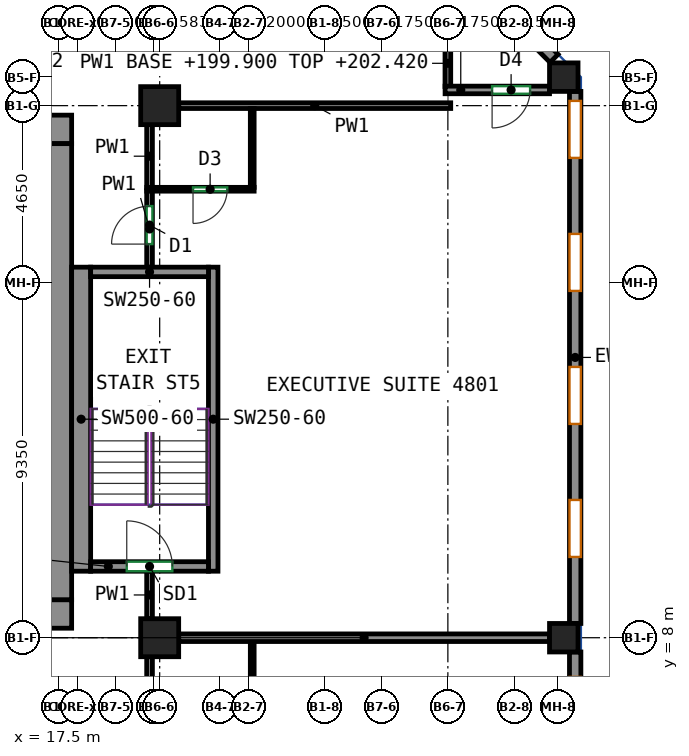
"""IFC4 building model, lengths in metres.
Left out: names, types, materials, properties, quantities, classifications, styles, units other than length and angle.
Written with IfcOpenShell. Run it as: python <this file> out.ifc"""

import sys

from ifc_helpers import new_model, si_unit, direction, frame, frame_2d, origin, origin_2d, place, context, subcontext, project, spatial, rectangle, extrude, source, transform, mapped, element, fill, save


model = new_model("IFC4")
c1 = context("Model", 3, precision=1e-05, world=origin(), true_north=direction((0.0, 1.0)))
c2 = subcontext(c1, "Body", "Model", "MODEL_VIEW")
j1 = project(units=[si_unit("LENGTHUNIT", "METRE"), si_unit("PLANEANGLEUNIT", "RADIAN")], contexts=[c1])
p1 = place(None, origin())
s1 = spatial("IfcSite", under=j1, at=p1, CompositionType="ELEMENT")
p2 = place(p1, origin())
s2 = spatial("IfcBuilding", under=s1, at=p2, CompositionType="ELEMENT")
p3 = place(p2, frame((0.0, 0.0, 199.9)))
s3 = spatial("IfcBuildingStorey", under=s2, at=p3, CompositionType="ELEMENT", Elevation=199.9)
m1 = source(origin(), c2, "Body", "SweptSolid", [
    extrude(rectangle(XDim=1.0, YDim=1.0, at=origin_2d()), origin(), (0.0, 0.0, 1.0), 3.12),
])
for number, where, z_axis, x_axis in (
    (1, (20.167, 8.0, 0.0), (0.0, 0.0, 1.0), (1.0, 0.0, 0.0)),
    (2, (20.167, 22.0, 0.0), (0.0, 0.0, 1.0), (1.0, 0.0, 0.0)),
):
    element("IfcColumn", number, at=place(p3, frame(where, z_axis=z_axis, x_axis=x_axis)), inside=s3, PredefinedType="COLUMN", context=c2, shape_type="MappedRepresentation", body=[
        mapped(m1, transform((0.0, 0.0, 0.0))),
    ])
m2 = source(origin(), c2, "Body", "SweptSolid", [
    extrude(rectangle(XDim=0.75, YDim=0.75, at=origin_2d()), origin(), (0.0, 0.0, 1.0), 3.12),
])
for number, where, z_axis, x_axis in (
    (3, (30.8, 8.0, 0.0), (0.0, 0.0, 1.0), (1.0, 0.0, 0.0)),
    (4, (30.8, 22.75, 0.0), (0.0, 0.0, 1.0), (1.0, 0.0, 0.0)),
):
    element("IfcColumn", number, at=place(p3, frame(where, z_axis=z_axis, x_axis=x_axis)), inside=s3, PredefinedType="COLUMN", context=c2, shape_type="MappedRepresentation", body=[
        mapped(m2, transform((0.0, 0.0, 0.0))),
    ])
m3 = source(origin(), c2, "Body", "SweptSolid", [
    extrude(rectangle(XDim=5.38, YDim=0.75, at=frame_2d((2.69, 0.0))), origin(), (0.0, 0.0, 1.0), 3.12),
])
p4 = place(p3, frame((12.47, 8.625, 0.0), z_axis=(0.0, 0.0, 1.0), x_axis=(1.0, 0.0, 0.0)))
e5 = element("IfcWall", 5, at=p4, inside=s3, PredefinedType="SHEAR", context=c2, shape_type="MappedRepresentation", body=[
    mapped(m3, transform((0.0, 0.0, 0.0))),
])
p5 = place(p4, frame((2.18, 0.0, 0.0)))
e6 = element("IfcOpeningElement", 6, at=p5, cuts=e5, PredefinedType="OPENING", context=c2, shape_type="SweptSolid", body=[
    extrude(rectangle(XDim=1.2, YDim=2.1, at=frame_2d((0.6, 1.05))), frame((0.0, 0.385, 0.0), z_axis=(0.0, -1.0, 0.0), x_axis=(1.0, 0.0, 0.0)), (0.0, 0.0, 1.0), 0.77),
])
m4 = source(origin(), c2, "Body", "SweptSolid", [
    extrude(rectangle(XDim=33.6, YDim=0.75, at=frame_2d((16.8, 0.0))), origin(), (0.0, 0.0, 1.0), 3.12),
])
p6 = place(p3, frame((-15.75, 21.375, 0.0), z_axis=(0.0, 0.0, 1.0), x_axis=(1.0, 0.0, 0.0)))
e7 = element("IfcWall", 7, at=p6, inside=s3, PredefinedType="SHEAR", context=c2, shape_type="MappedRepresentation", body=[
    mapped(m4, transform((0.0, 0.0, 0.0))),
])
p7 = place(p6, frame((8.27, 0.0, 0.0)))
e8 = element("IfcOpeningElement", 8, at=p7, cuts=e7, PredefinedType="OPENING", context=c2, shape_type="SweptSolid", body=[
    extrude(rectangle(XDim=0.9, YDim=2.1, at=frame_2d((0.45, 1.05))), frame((0.0, 0.385, 0.0), z_axis=(0.0, -1.0, 0.0), x_axis=(1.0, 0.0, 0.0)), (0.0, 0.0, 1.0), 0.77),
])
p8 = place(p6, frame((14.97, 0.0, 0.0)))
e9 = element("IfcOpeningElement", 9, at=p8, cuts=e7, PredefinedType="OPENING", context=c2, shape_type="SweptSolid", body=[
    extrude(rectangle(XDim=0.9, YDim=2.1, at=frame_2d((0.45, 1.05))), frame((0.0, 0.385, 0.0), z_axis=(0.0, -1.0, 0.0), x_axis=(1.0, 0.0, 0.0)), (0.0, 0.0, 1.0), 0.77),
])
p9 = place(p6, frame((19.794, 0.0, 0.0)))
e10 = element("IfcOpeningElement", 10, at=p9, cuts=e7, PredefinedType="OPENING", context=c2, shape_type="SweptSolid", body=[
    extrude(rectangle(XDim=0.9, YDim=2.1, at=frame_2d((0.45, 1.05))), frame((0.0, 0.385, 0.0), z_axis=(0.0, -1.0, 0.0), x_axis=(1.0, 0.0, 0.0)), (0.0, 0.0, 1.0), 0.77),
])
p10 = place(p6, frame((25.154, 0.0, 0.0)))
e11 = element("IfcOpeningElement", 11, at=p10, cuts=e7, PredefinedType="OPENING", context=c2, shape_type="SweptSolid", body=[
    extrude(rectangle(XDim=0.9, YDim=2.1, at=frame_2d((0.45, 1.05))), frame((0.0, 0.385, 0.0), z_axis=(0.0, -1.0, 0.0), x_axis=(1.0, 0.0, 0.0)), (0.0, 0.0, 1.0), 0.77),
])
p11 = place(p6, frame((2.275, 0.0, 0.0)))
e12 = element("IfcOpeningElement", 12, at=p11, cuts=e7, PredefinedType="OPENING", context=c2, shape_type="SweptSolid", body=[
    extrude(rectangle(XDim=0.9, YDim=2.1, at=frame_2d((0.45, 1.05))), frame((0.0, 0.385, 0.0), z_axis=(0.0, -1.0, 0.0), x_axis=(1.0, 0.0, 0.0)), (0.0, 0.0, 1.0), 0.77),
])
p12 = place(p6, frame((30.425, 0.0, 0.0)))
e13 = element("IfcOpeningElement", 13, at=p12, cuts=e7, PredefinedType="OPENING", context=c2, shape_type="SweptSolid", body=[
    extrude(rectangle(XDim=0.9, YDim=2.1, at=frame_2d((0.45, 1.05))), frame((0.0, 0.385, 0.0), z_axis=(0.0, -1.0, 0.0), x_axis=(1.0, 0.0, 0.0)), (0.0, 0.0, 1.0), 0.77),
])
m5 = source(origin(), c2, "Body", "SweptSolid", [
    extrude(rectangle(XDim=12.0, YDim=0.75, at=frame_2d((6.0, 0.0))), origin(), (0.0, 0.0, 1.0), 3.12),
])
p13 = place(p3, frame((17.475, 9.0, 0.0), z_axis=(0.0, 0.0, 1.0), x_axis=(0.0, 1.0, 0.0)))
e14 = element("IfcWall", 14, at=p13, inside=s3, PredefinedType="SHEAR", context=c2, shape_type="MappedRepresentation", body=[
    mapped(m5, transform((0.0, 0.0, 0.0))),
])
m6 = source(origin(), c2, "Body", "SweptSolid", [
    extrude(rectangle(XDim=8.0, YDim=0.5, at=frame_2d((4.0, 0.0))), origin(), (0.0, 0.0, 1.0), 3.12),
])
p14 = place(p3, frame((18.1, 9.75, 0.0), z_axis=(0.0, 0.0, 1.0), x_axis=(0.0, 1.0, 0.0)))
e15 = element("IfcWall", 15, at=p14, inside=s3, PredefinedType="SHEAR", context=c2, shape_type="MappedRepresentation", body=[
    mapped(m6, transform((0.0, 0.0, 0.0))),
])
m7 = source(origin(), c2, "Body", "SweptSolid", [
    extrude(rectangle(XDim=8.0, YDim=0.25, at=frame_2d((4.0, 0.0))), origin(), (0.0, 0.0, 1.0), 3.12),
])
p15 = place(p3, frame((21.575, 9.75, 0.0), z_axis=(0.0, 0.0, 1.0), x_axis=(0.0, 1.0, 0.0)))
e16 = element("IfcWall", 16, at=p15, inside=s3, PredefinedType="SHEAR", context=c2, shape_type="MappedRepresentation", body=[
    mapped(m7, transform((0.0, 0.0, 0.0))),
])
m8 = source(origin(), c2, "Body", "SweptSolid", [
    extrude(rectangle(XDim=3.1, YDim=0.25, at=frame_2d((1.55, 0.0))), origin(), (0.0, 0.0, 1.0), 3.12),
])
p16 = place(p3, frame((18.35, 9.875, 0.0), z_axis=(0.0, 0.0, 1.0), x_axis=(1.0, 0.0, 0.0)))
e17 = element("IfcWall", 17, at=p16, inside=s3, PredefinedType="SHEAR", context=c2, shape_type="MappedRepresentation", body=[
    mapped(m8, transform((0.0, 0.0, 0.0))),
])
p17 = place(p16, frame((0.95, 0.0, 0.0)))
e18 = element("IfcOpeningElement", 18, at=p17, cuts=e17, PredefinedType="OPENING", context=c2, shape_type="SweptSolid", body=[
    extrude(rectangle(XDim=1.2, YDim=2.1, at=frame_2d((0.6, 1.05))), frame((0.0, 0.135, 0.0), z_axis=(0.0, -1.0, 0.0), x_axis=(1.0, 0.0, 0.0)), (0.0, 0.0, 1.0), 0.27),
])
p18 = place(p3, frame((18.35, 17.625, 0.0), z_axis=(0.0, 0.0, 1.0), x_axis=(1.0, 0.0, 0.0)))
e19 = element("IfcWall", 19, at=p18, inside=s3, PredefinedType="SHEAR", context=c2, shape_type="MappedRepresentation", body=[
    mapped(m8, transform((0.0, 0.0, 0.0))),
])
m9 = source(origin(), c2, "Body", "SweptSolid", [
    extrude(rectangle(XDim=7.812, YDim=0.3, at=frame_2d((3.906, 0.0))), origin(), (0.0, 0.0, 1.0), 3.12),
])
p19 = place(p3, frame((31.1, -0.188, 0.0), z_axis=(0.0, 0.0, 1.0), x_axis=(0.0, 1.0, 0.0)))
e20 = element("IfcWall", 20, at=p19, inside=s3, PredefinedType="SOLIDWALL", context=c2, shape_type="MappedRepresentation", body=[
    mapped(m9, transform((0.0, 0.0, 0.0))),
])
p20 = place(p19, frame((1.75, 0.0, 0.85)))
e21 = element("IfcOpeningElement", 21, at=p20, cuts=e20, PredefinedType="OPENING", context=c2, shape_type="SweptSolid", body=[
    extrude(rectangle(XDim=1.5, YDim=1.95, at=frame_2d((0.75, 0.975))), frame((0.0, 0.16, 0.0), z_axis=(0.0, -1.0, 0.0), x_axis=(1.0, 0.0, 0.0)), (0.0, 0.0, 1.0), 0.32),
])
p21 = place(p19, frame((5.656, 0.0, 0.85)))
e22 = element("IfcOpeningElement", 22, at=p21, cuts=e20, PredefinedType="OPENING", context=c2, shape_type="SweptSolid", body=[
    extrude(rectangle(XDim=1.5, YDim=1.95, at=frame_2d((0.75, 0.975))), frame((0.0, 0.16, 0.0), z_axis=(0.0, -1.0, 0.0), x_axis=(1.0, 0.0, 0.0)), (0.0, 0.0, 1.0), 0.32),
])
m10 = source(origin(), c2, "Body", "SweptSolid", [
    extrude(rectangle(XDim=14.0, YDim=0.3, at=frame_2d((7.0, 0.0))), origin(), (0.0, 0.0, 1.0), 3.12),
])
p22 = place(p3, frame((31.1, 8.375, 0.0), z_axis=(0.0, 0.0, 1.0), x_axis=(0.0, 1.0, 0.0)))
e23 = element("IfcWall", 23, at=p22, inside=s3, PredefinedType="SOLIDWALL", context=c2, shape_type="MappedRepresentation", body=[
    mapped(m10, transform((0.0, 0.0, 0.0))),
])
p23 = place(p22, frame((1.75, 0.0, 0.85)))
e24 = element("IfcOpeningElement", 24, at=p23, cuts=e23, PredefinedType="OPENING", context=c2, shape_type="SweptSolid", body=[
    extrude(rectangle(XDim=1.5, YDim=1.95, at=frame_2d((0.75, 0.975))), frame((0.0, 0.16, 0.0), z_axis=(0.0, -1.0, 0.0), x_axis=(1.0, 0.0, 0.0)), (0.0, 0.0, 1.0), 0.32),
])
p24 = place(p22, frame((5.25, 0.0, 0.85)))
e25 = element("IfcOpeningElement", 25, at=p24, cuts=e23, PredefinedType="OPENING", context=c2, shape_type="SweptSolid", body=[
    extrude(rectangle(XDim=1.5, YDim=1.95, at=frame_2d((0.75, 0.975))), frame((0.0, 0.16, 0.0), z_axis=(0.0, -1.0, 0.0), x_axis=(1.0, 0.0, 0.0)), (0.0, 0.0, 1.0), 0.32),
])
p25 = place(p22, frame((8.75, 0.0, 0.85)))
e26 = element("IfcOpeningElement", 26, at=p25, cuts=e23, PredefinedType="OPENING", context=c2, shape_type="SweptSolid", body=[
    extrude(rectangle(XDim=1.5, YDim=1.95, at=frame_2d((0.75, 0.975))), frame((0.0, 0.16, 0.0), z_axis=(0.0, -1.0, 0.0), x_axis=(1.0, 0.0, 0.0)), (0.0, 0.0, 1.0), 0.32),
])
p26 = place(p22, frame((12.25, 0.0, 0.85)))
e27 = element("IfcOpeningElement", 27, at=p26, cuts=e23, PredefinedType="OPENING", context=c2, shape_type="SweptSolid", body=[
    extrude(rectangle(XDim=1.5, YDim=1.95, at=frame_2d((0.75, 0.975))), frame((0.0, 0.16, 0.0), z_axis=(0.0, -1.0, 0.0), x_axis=(1.0, 0.0, 0.0)), (0.0, 0.0, 1.0), 0.32),
])
m11 = source(origin(), c2, "Body", "SweptSolid", [
    extrude(rectangle(XDim=3.571, YDim=0.3, at=frame_2d((1.786, 0.0))), origin(), (0.0, 0.0, 1.0), 3.12),
])
p27 = place(p3, frame((30.544, 23.244, 0.0), z_axis=(0.0, 0.0, 1.0), x_axis=(-0.707140964879, 0.707072595841, 0.0)))
e28 = element("IfcWall", 28, at=p27, inside=s3, PredefinedType="SOLIDWALL", context=c2, shape_type="MappedRepresentation", body=[
    mapped(m11, transform((0.0, 0.0, 0.0))),
])
p28 = place(p27, frame((0.686, 0.0, 0.85)))
e29 = element("IfcOpeningElement", 29, at=p28, cuts=e28, PredefinedType="OPENING", context=c2, shape_type="SweptSolid", body=[
    extrude(rectangle(XDim=2.2, YDim=1.95, at=frame_2d((1.1, 0.975))), frame((0.0, 0.16, 0.0), z_axis=(0.0, -1.0, 0.0), x_axis=(1.0, 0.0, 0.0)), (0.0, 0.0, 1.0), 0.32),
])
p29 = place(p3, frame((19.9, 5.84, 0.0), z_axis=(0.0, 0.0, 1.0), x_axis=(0.0, 1.0, 0.0)))
e30 = element("IfcWall", 30, at=p29, inside=s3, PredefinedType="PARTITIONING", context=c2, shape_type="SweptSolid", body=[
    extrude(rectangle(XDim=1.66, YDim=0.15, at=frame_2d((0.83, 0.0))), origin(), (0.0, 0.0, 1.0), 2.52),
])
p30 = place(p3, frame((19.9, 17.75, 0.0), z_axis=(0.0, 0.0, 1.0), x_axis=(0.0, 1.0, 0.0)))
e31 = element("IfcWall", 31, at=p30, inside=s3, PredefinedType="PARTITIONING", context=c2, shape_type="SweptSolid", body=[
    extrude(rectangle(XDim=2.01, YDim=0.15, at=frame_2d((1.005, 0.0))), origin(), (0.0, 0.0, 1.0), 3.12),
])
p31 = place(p30, frame((0.607, 0.0, 0.0)))
e32 = element("IfcOpeningElement", 32, at=p31, cuts=e31, PredefinedType="OPENING", context=c2, shape_type="SweptSolid", body=[
    extrude(rectangle(XDim=1.0, YDim=2.1, at=frame_2d((0.5, 1.05))), frame((0.0, 0.085, 0.0), z_axis=(0.0, -1.0, 0.0), x_axis=(1.0, 0.0, 0.0)), (0.0, 0.0, 1.0), 0.17),
])
p32 = place(p3, frame((19.9, 8.5, 0.0), z_axis=(0.0, 0.0, 1.0), x_axis=(0.0, 1.0, 0.0)))
e33 = element("IfcWall", 33, at=p32, inside=s3, PredefinedType="PARTITIONING", context=c2, shape_type="SweptSolid", body=[
    extrude(rectangle(XDim=1.25, YDim=0.15, at=frame_2d((0.625, 0.0))), origin(), (0.0, 0.0, 1.0), 3.12),
])
p33 = place(p3, frame((20.667, 22.0, 0.0), z_axis=(0.0, 0.0, 1.0), x_axis=(1.0, 0.0, 0.0)))
e34 = element("IfcWall", 34, at=p33, inside=s3, PredefinedType="PARTITIONING", context=c2, shape_type="SweptSolid", body=[
    extrude(rectangle(XDim=7.158, YDim=0.15, at=frame_2d((3.579, 0.0))), origin(), (0.0, 0.0, 1.0), 3.12),
])
p34 = place(p3, frame((19.9, 19.84, 0.0), z_axis=(0.0, 0.0, 1.0), x_axis=(0.0, 1.0, 0.0)))
e35 = element("IfcWall", 35, at=p34, inside=s3, PredefinedType="PARTITIONING", context=c2, shape_type="SweptSolid", body=[
    extrude(rectangle(XDim=1.66, YDim=0.15, at=frame_2d((0.83, 0.0))), origin(), (0.0, 0.0, 1.0), 3.12),
])
p35 = place(p3, frame((27.75, 22.503, 0.0), z_axis=(0.0, 0.0, 1.0), x_axis=(0.0, 1.0, 0.0)))
e36 = element("IfcWall", 36, at=p35, inside=s3, PredefinedType="PARTITIONING", context=c2, shape_type="SweptSolid", body=[
    extrude(rectangle(XDim=1.222, YDim=0.15, at=frame_2d((0.611, 0.0))), origin(), (0.0, 0.0, 1.0), 2.52),
])
p36 = place(p3, frame((22.602, 5.85, 0.0), z_axis=(0.0, 0.0, 1.0), x_axis=(0.0, 1.0, 0.0)))
e37 = element("IfcWall", 37, at=p36, inside=s3, PredefinedType="PARTITIONING", context=c2, shape_type="SweptSolid", body=[
    extrude(rectangle(XDim=2.05, YDim=0.1, at=frame_2d((1.025, 0.0))), origin(), (0.0, 0.0, 1.0), 3.12),
])
p37 = place(p3, frame((20.667, 8.0, 0.0), z_axis=(0.0, 0.0, 1.0), x_axis=(1.0, 0.0, 0.0)))
e38 = element("IfcWall", 38, at=p37, inside=s3, PredefinedType="PARTITIONING", context=c2, shape_type="SweptSolid", body=[
    extrude(rectangle(XDim=9.758, YDim=0.2, at=frame_2d((4.879, 0.0))), origin(), (0.0, 0.0, 1.0), 2.52),
])
p38 = place(p3, frame((22.652, 19.8, 0.0), z_axis=(0.0, 0.0, 1.0), x_axis=(-1.0, 0.0, 0.0)))
e39 = element("IfcWall", 39, at=p38, inside=s3, PredefinedType="PARTITIONING", context=c2, shape_type="SweptSolid", body=[
    extrude(rectangle(XDim=2.825, YDim=0.1, at=frame_2d((1.413, 0.0))), origin(), (0.0, 0.0, 1.0), 3.12),
])
p39 = place(p38, frame((0.708, 0.0, 0.0)))
e40 = element("IfcOpeningElement", 40, at=p39, cuts=e39, PredefinedType="OPENING", context=c2, shape_type="SweptSolid", body=[
    extrude(rectangle(XDim=0.9, YDim=2.1, at=frame_2d((0.45, 1.05))), frame((0.0, 0.06, 0.0), z_axis=(0.0, -1.0, 0.0), x_axis=(1.0, 0.0, 0.0)), (0.0, 0.0, 1.0), 0.12),
])
p40 = place(p3, frame((22.602, 19.85, 0.0), z_axis=(0.0, 0.0, 1.0), x_axis=(0.0, 1.0, 0.0)))
e41 = element("IfcWall", 41, at=p40, inside=s3, PredefinedType="PARTITIONING", context=c2, shape_type="SweptSolid", body=[
    extrude(rectangle(XDim=2.073, YDim=0.1, at=frame_2d((1.037, 0.0))), origin(), (0.0, 0.0, 1.0), 3.12),
])
p41 = place(p3, frame((30.425, 22.413, 0.0), z_axis=(0.0, 0.0, 1.0), x_axis=(-1.0, 0.0, 0.0)))
e42 = element("IfcWall", 42, at=p41, inside=s3, PredefinedType="PARTITIONING", context=c2, shape_type="SweptSolid", body=[
    extrude(rectangle(XDim=2.748, YDim=0.2, at=frame_2d((1.374, 0.0))), origin(), (0.0, 0.0, 1.0), 2.52),
])
p42 = place(p41, frame((0.511, 0.0, 0.0)))
e43 = element("IfcOpeningElement", 43, at=p42, cuts=e42, PredefinedType="OPENING", context=c2, shape_type="SweptSolid", body=[
    extrude(rectangle(XDim=1.0, YDim=2.1, at=frame_2d((0.5, 1.05))), frame((0.0, 0.11, 0.0), z_axis=(0.0, -1.0, 0.0), x_axis=(1.0, 0.0, 0.0)), (0.0, 0.0, 1.0), 0.22),
])
p43 = place(p23, origin())
e44 = element("IfcWindow", 44, at=p43, inside=s3, PartitioningType="SINGLE_PANEL", PredefinedType="WINDOW", context=c2, shape_type="SweptSolid", body=[
    extrude(rectangle(XDim=1.5, YDim=1.95, at=frame_2d((0.75, 0.975))), frame((0.0, 0.03, 0.0), z_axis=(0.0, -1.0, 0.0), x_axis=(1.0, 0.0, 0.0)), (0.0, 0.0, 1.0), 0.06),
])
fill(e24, e44)
p44 = place(p24, origin())
e45 = element("IfcWindow", 45, at=p44, inside=s3, PartitioningType="SINGLE_PANEL", PredefinedType="WINDOW", context=c2, shape_type="SweptSolid", body=[
    extrude(rectangle(XDim=1.5, YDim=1.95, at=frame_2d((0.75, 0.975))), frame((0.0, 0.03, 0.0), z_axis=(0.0, -1.0, 0.0), x_axis=(1.0, 0.0, 0.0)), (0.0, 0.0, 1.0), 0.06),
])
fill(e25, e45)
p45 = place(p25, origin())
e46 = element("IfcWindow", 46, at=p45, inside=s3, PartitioningType="SINGLE_PANEL", PredefinedType="WINDOW", context=c2, shape_type="SweptSolid", body=[
    extrude(rectangle(XDim=1.5, YDim=1.95, at=frame_2d((0.75, 0.975))), frame((0.0, 0.03, 0.0), z_axis=(0.0, -1.0, 0.0), x_axis=(1.0, 0.0, 0.0)), (0.0, 0.0, 1.0), 0.06),
])
fill(e26, e46)
p46 = place(p26, origin())
e47 = element("IfcWindow", 47, at=p46, inside=s3, PartitioningType="SINGLE_PANEL", PredefinedType="WINDOW", context=c2, shape_type="SweptSolid", body=[
    extrude(rectangle(XDim=1.5, YDim=1.95, at=frame_2d((0.75, 0.975))), frame((0.0, 0.03, 0.0), z_axis=(0.0, -1.0, 0.0), x_axis=(1.0, 0.0, 0.0)), (0.0, 0.0, 1.0), 0.06),
])
fill(e27, e47)
p47 = place(p17, origin())
e48 = element("IfcDoor", 48, at=p47, inside=s3, OperationType="DOUBLE_DOOR_SINGLE_SWING", PredefinedType="DOOR", context=c2, shape_type="SweptSolid", body=[
    extrude(rectangle(XDim=1.2, YDim=2.1, at=frame_2d((0.6, 1.05))), frame((0.0, 0.025, 0.0), z_axis=(0.0, -1.0, 0.0), x_axis=(1.0, 0.0, 0.0)), (0.0, 0.0, 1.0), 0.05),
])
fill(e18, e48)
p48 = place(p31, origin())
e49 = element("IfcDoor", 49, at=p48, inside=s3, OperationType="SINGLE_SWING_LEFT", PredefinedType="DOOR", context=c2, shape_type="SweptSolid", body=[
    extrude(rectangle(XDim=1.0, YDim=2.1, at=frame_2d((0.5, 1.05))), frame((0.0, 0.025, 0.0), z_axis=(0.0, -1.0, 0.0), x_axis=(1.0, 0.0, 0.0)), (0.0, 0.0, 1.0), 0.05),
])
fill(e32, e49)
p49 = place(p39, origin())
e50 = element("IfcDoor", 50, at=p49, inside=s3, OperationType="SINGLE_SWING_RIGHT", PredefinedType="DOOR", context=c2, shape_type="SweptSolid", body=[
    extrude(rectangle(XDim=0.9, YDim=2.1, at=frame_2d((0.45, 1.05))), frame((0.0, 0.025, 0.0), z_axis=(0.0, -1.0, 0.0), x_axis=(1.0, 0.0, 0.0)), (0.0, 0.0, 1.0), 0.05),
])
fill(e40, e50)
p50 = place(p42, origin())
e51 = element("IfcDoor", 51, at=p50, inside=s3, OperationType="SINGLE_SWING_RIGHT", PredefinedType="DOOR", context=c2, shape_type="SweptSolid", body=[
    extrude(rectangle(XDim=1.0, YDim=2.1, at=frame_2d((0.5, 1.05))), frame((0.0, 0.025, 0.0), z_axis=(0.0, -1.0, 0.0), x_axis=(1.0, 0.0, 0.0)), (0.0, 0.0, 1.0), 0.05),
])
fill(e43, e51)
save(model, sys.argv[1])
